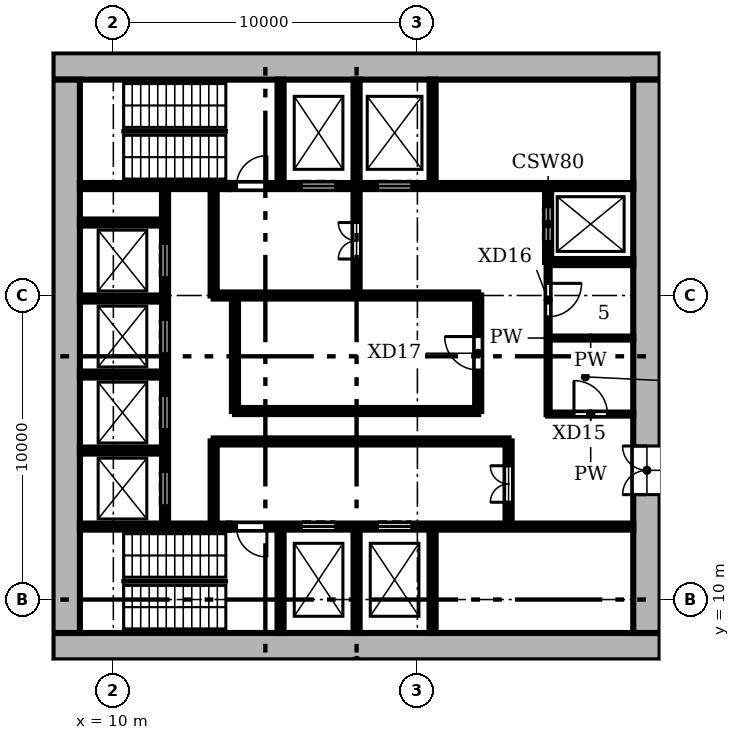
"""IFC4 building model, lengths in metres.
Left out: names, types, materials, properties, quantities, classifications, styles, units other than length and angle.
Written with IfcOpenShell. Run it as: python <this file> out.ifc"""

import sys

from ifc_helpers import new_model, si_unit, direction, frame, frame_2d, origin, place, context, subcontext, project, spatial, rectangle, extrude, element, fill, save


model = new_model("IFC4")
c1 = context("Model", 3, precision=1e-05, world=origin(), true_north=direction((0.0, 1.0)))
c2 = subcontext(c1, "Body", "Model", "MODEL_VIEW")
j1 = project(units=[si_unit("LENGTHUNIT", "METRE"), si_unit("PLANEANGLEUNIT", "RADIAN")], contexts=[c1])
p1 = place(None, origin())
s1 = spatial("IfcSite", under=j1, at=p1, CompositionType="ELEMENT")
p2 = place(p1, origin())
s2 = spatial("IfcBuilding", under=s1, at=p2, CompositionType="ELEMENT")
p3 = place(p2, frame((0.0, 0.0, -9.0)))
s3 = spatial("IfcBuildingStorey", under=s2, at=p3, CompositionType="ELEMENT", Elevation=-9.0)
p4 = place(p3, frame((8.0, 8.45, 0.0), z_axis=(0.0, 0.0, 1.0), x_axis=(1.0, 0.0, 0.0)))
e1 = element("IfcWall", 1, at=p4, inside=s3, PredefinedType="SHEAR", context=c2, shape_type="SweptSolid", body=[
    extrude(rectangle(XDim=20.0, YDim=0.9, at=frame_2d((10.0, 0.0))), origin(), (0.0, 0.0, 1.0), 4.5),
])
p5 = place(p3, frame((27.55, 8.9, 0.0), z_axis=(0.0, 0.0, 1.0), x_axis=(0.0, 1.0, 0.0)))
e2 = element("IfcWall", 2, at=p5, inside=s3, PredefinedType="SHEAR", context=c2, shape_type="SweptSolid", body=[
    extrude(rectangle(XDim=18.2, YDim=0.9, at=frame_2d((9.1, 0.0))), origin(), (0.0, 0.0, 1.0), 4.5),
])
p6 = place(p5, frame((4.55, 0.0, 0.0)))
e3 = element("IfcOpeningElement", 3, at=p6, cuts=e2, PredefinedType="OPENING", context=c2, shape_type="SweptSolid", body=[
    extrude(rectangle(XDim=1.6, YDim=2.1, at=frame_2d((0.8, 1.05))), frame((0.0, 0.46, 0.0), z_axis=(0.0, -1.0, 0.0), x_axis=(1.0, 0.0, 0.0)), (0.0, 0.0, 1.0), 0.92),
])
p7 = place(p3, frame((28.0, 27.55, 0.0), z_axis=(0.0, 0.0, 1.0), x_axis=(-1.0, 0.0, 0.0)))
e4 = element("IfcWall", 4, at=p7, inside=s3, PredefinedType="SHEAR", context=c2, shape_type="SweptSolid", body=[
    extrude(rectangle(XDim=20.0, YDim=0.9, at=frame_2d((10.0, 0.0))), origin(), (0.0, 0.0, 1.0), 4.5),
])
p8 = place(p3, frame((8.45, 27.1, 0.0), z_axis=(0.0, 0.0, 1.0), x_axis=(0.0, -1.0, 0.0)))
e5 = element("IfcWall", 5, at=p8, inside=s3, PredefinedType="SHEAR", context=c2, shape_type="SweptSolid", body=[
    extrude(rectangle(XDim=18.2, YDim=0.9, at=frame_2d((9.1, 0.0))), origin(), (0.0, 0.0, 1.0), 4.5),
])
p9 = place(p3, frame((8.9, 12.4, 0.0), z_axis=(0.0, 0.0, 1.0), x_axis=(1.0, 0.0, 0.0)))
e6 = element("IfcWall", 6, at=p9, inside=s3, PredefinedType="SHEAR", context=c2, shape_type="SweptSolid", body=[
    extrude(rectangle(XDim=4.9, YDim=0.2, at=frame_2d((2.45, 0.0))), origin(), (0.0, 0.0, 1.0), 4.1),
])
p10 = place(p3, frame((13.8, 12.4, 0.0), z_axis=(0.0, 0.0, 1.0), x_axis=(1.0, 0.0, 0.0)))
e7 = element("IfcWall", 7, at=p10, inside=s3, PredefinedType="SHEAR", context=c2, shape_type="SweptSolid", body=[
    extrude(rectangle(XDim=13.3, YDim=0.2, at=frame_2d((6.65, 0.0))), origin(), (0.0, 0.0, 1.0), 4.1),
])
p11 = place(p10, frame((2.4, 0.0, 0.0)))
e8 = element("IfcOpeningElement", 8, at=p11, cuts=e7, PredefinedType="OPENING", context=c2, shape_type="SweptSolid", body=[
    extrude(rectangle(XDim=1.1, YDim=2.1, at=frame_2d((0.55, 1.05))), frame((0.0, 0.11, 0.0), z_axis=(0.0, -1.0, 0.0), x_axis=(1.0, 0.0, 0.0)), (0.0, 0.0, 1.0), 0.22),
])
p12 = place(p10, frame((4.9, 0.0, 0.0)))
e9 = element("IfcOpeningElement", 9, at=p12, cuts=e7, PredefinedType="OPENING", context=c2, shape_type="SweptSolid", body=[
    extrude(rectangle(XDim=1.1, YDim=2.1, at=frame_2d((0.55, 1.05))), frame((0.0, 0.11, 0.0), z_axis=(0.0, -1.0, 0.0), x_axis=(1.0, 0.0, 0.0)), (0.0, 0.0, 1.0), 0.22),
])
p13 = place(p10, frame((0.25, 0.0, 0.0)))
e10 = element("IfcOpeningElement", 10, at=p13, cuts=e7, PredefinedType="OPENING", context=c2, shape_type="SweptSolid", body=[
    extrude(rectangle(XDim=1.0, YDim=2.1, at=frame_2d((0.5, 1.05))), frame((0.0, 0.11, 0.0), z_axis=(0.0, -1.0, 0.0), x_axis=(1.0, 0.0, 0.0)), (0.0, 0.0, 1.0), 0.22),
])
p14 = place(p3, frame((8.9, 14.9, 0.0), z_axis=(0.0, 0.0, 1.0), x_axis=(1.0, 0.0, 0.0)))
e11 = element("IfcWall", 11, at=p14, inside=s3, PredefinedType="SHEAR", context=c2, shape_type="SweptSolid", body=[
    extrude(rectangle(XDim=2.8, YDim=0.2, at=frame_2d((1.4, 0.0))), origin(), (0.0, 0.0, 1.0), 4.1),
])
p15 = place(p3, frame((13.3, 15.2, 0.0), z_axis=(0.0, 0.0, 1.0), x_axis=(1.0, 0.0, 0.0)))
e12 = element("IfcWall", 12, at=p15, inside=s3, PredefinedType="SHEAR", context=c2, shape_type="SweptSolid", body=[
    extrude(rectangle(XDim=9.7, YDim=0.2, at=frame_2d((4.85, 0.0))), origin(), (0.0, 0.0, 1.0), 4.1),
])
p16 = place(p3, frame((24.3, 16.1, 0.0), z_axis=(0.0, 0.0, 1.0), x_axis=(1.0, 0.0, 0.0)))
e13 = element("IfcWall", 13, at=p16, inside=s3, PredefinedType="PARTITIONING", context=c2, shape_type="SweptSolid", body=[
    extrude(rectangle(XDim=2.8, YDim=0.1, at=frame_2d((1.4, 0.0))), origin(), (0.0, 0.0, 1.0), 4.1),
])
p17 = place(p16, frame((0.85, 0.0, 0.0)))
e14 = element("IfcOpeningElement", 14, at=p17, cuts=e13, PredefinedType="OPENING", context=c2, shape_type="SweptSolid", body=[
    extrude(rectangle(XDim=1.1, YDim=2.1, at=frame_2d((0.55, 1.05))), frame((0.0, 0.06, 0.0), z_axis=(0.0, -1.0, 0.0), x_axis=(1.0, 0.0, 0.0)), (0.0, 0.0, 1.0), 0.12),
])
p18 = place(p3, frame((14.0, 16.2, 0.0), z_axis=(0.0, 0.0, 1.0), x_axis=(1.0, 0.0, 0.0)))
e15 = element("IfcWall", 15, at=p18, inside=s3, PredefinedType="SHEAR", context=c2, shape_type="SweptSolid", body=[
    extrude(rectangle(XDim=8.0, YDim=0.2, at=frame_2d((4.0, 0.0))), origin(), (0.0, 0.0, 1.0), 4.1),
])
p19 = place(p3, frame((8.9, 17.4, 0.0), z_axis=(0.0, 0.0, 1.0), x_axis=(1.0, 0.0, 0.0)))
e16 = element("IfcWall", 16, at=p19, inside=s3, PredefinedType="SHEAR", context=c2, shape_type="SweptSolid", body=[
    extrude(rectangle(XDim=2.8, YDim=0.2, at=frame_2d((1.4, 0.0))), origin(), (0.0, 0.0, 1.0), 4.1),
])
p20 = place(p3, frame((24.3, 18.6, 0.0), z_axis=(0.0, 0.0, 1.0), x_axis=(1.0, 0.0, 0.0)))
e17 = element("IfcWall", 17, at=p20, inside=s3, PredefinedType="PARTITIONING", context=c2, shape_type="SweptSolid", body=[
    extrude(rectangle(XDim=2.8, YDim=0.1, at=frame_2d((1.4, 0.0))), origin(), (0.0, 0.0, 1.0), 4.1),
])
p21 = place(p3, frame((8.9, 19.9, 0.0), z_axis=(0.0, 0.0, 1.0), x_axis=(1.0, 0.0, 0.0)))
e18 = element("IfcWall", 18, at=p21, inside=s3, PredefinedType="SHEAR", context=c2, shape_type="SweptSolid", body=[
    extrude(rectangle(XDim=2.8, YDim=0.2, at=frame_2d((1.4, 0.0))), origin(), (0.0, 0.0, 1.0), 4.1),
])
p22 = place(p3, frame((13.3, 20.0, 0.0), z_axis=(0.0, 0.0, 1.0), x_axis=(1.0, 0.0, 0.0)))
e19 = element("IfcWall", 19, at=p22, inside=s3, PredefinedType="SHEAR", context=c2, shape_type="SweptSolid", body=[
    extrude(rectangle(XDim=8.7, YDim=0.2, at=frame_2d((4.35, 0.0))), origin(), (0.0, 0.0, 1.0), 4.1),
])
for number, where, z_axis, x_axis in (
    (20, (24.3, 21.1, 0.0), (0.0, 0.0, 1.0), (1.0, 0.0, 0.0)),
    (21, (8.9, 22.4, 0.0), (0.0, 0.0, 1.0), (1.0, 0.0, 0.0)),
):
    element("IfcWall", number, at=place(p3, frame(where, z_axis=z_axis, x_axis=x_axis)), inside=s3, PredefinedType="SHEAR", context=c2, shape_type="SweptSolid", body=[
        extrude(rectangle(XDim=2.8, YDim=0.2, at=frame_2d((1.4, 0.0))), origin(), (0.0, 0.0, 1.0), 4.1),
    ])
p23 = place(p3, frame((8.9, 23.6, 0.0), z_axis=(0.0, 0.0, 1.0), x_axis=(1.0, 0.0, 0.0)))
e22 = element("IfcWall", 22, at=p23, inside=s3, PredefinedType="SHEAR", context=c2, shape_type="SweptSolid", body=[
    extrude(rectangle(XDim=4.9, YDim=0.2, at=frame_2d((2.45, 0.0))), origin(), (0.0, 0.0, 1.0), 4.1),
])
p24 = place(p3, frame((13.8, 23.6, 0.0), z_axis=(0.0, 0.0, 1.0), x_axis=(1.0, 0.0, 0.0)))
e23 = element("IfcWall", 23, at=p24, inside=s3, PredefinedType="SHEAR", context=c2, shape_type="SweptSolid", body=[
    extrude(rectangle(XDim=13.3, YDim=0.2, at=frame_2d((6.65, 0.0))), origin(), (0.0, 0.0, 1.0), 4.1),
])
p25 = place(p24, frame((2.4, 0.0, 0.0)))
e24 = element("IfcOpeningElement", 24, at=p25, cuts=e23, PredefinedType="OPENING", context=c2, shape_type="SweptSolid", body=[
    extrude(rectangle(XDim=1.1, YDim=2.1, at=frame_2d((0.55, 1.05))), frame((0.0, 0.11, 0.0), z_axis=(0.0, -1.0, 0.0), x_axis=(1.0, 0.0, 0.0)), (0.0, 0.0, 1.0), 0.22),
])
p26 = place(p24, frame((4.9, 0.0, 0.0)))
e25 = element("IfcOpeningElement", 25, at=p26, cuts=e23, PredefinedType="OPENING", context=c2, shape_type="SweptSolid", body=[
    extrude(rectangle(XDim=1.1, YDim=2.1, at=frame_2d((0.55, 1.05))), frame((0.0, 0.11, 0.0), z_axis=(0.0, -1.0, 0.0), x_axis=(1.0, 0.0, 0.0)), (0.0, 0.0, 1.0), 0.22),
])
p27 = place(p24, frame((0.25, 0.0, 0.0)))
e26 = element("IfcOpeningElement", 26, at=p27, cuts=e23, PredefinedType="OPENING", context=c2, shape_type="SweptSolid", body=[
    extrude(rectangle(XDim=1.0, YDim=2.1, at=frame_2d((0.5, 1.05))), frame((0.0, 0.11, 0.0), z_axis=(0.0, -1.0, 0.0), x_axis=(1.0, 0.0, 0.0)), (0.0, 0.0, 1.0), 0.22),
])
p28 = place(p3, frame((11.7, 12.4, 0.0), z_axis=(0.0, 0.0, 1.0), x_axis=(0.0, 1.0, 0.0)))
e27 = element("IfcWall", 27, at=p28, inside=s3, PredefinedType="SHEAR", context=c2, shape_type="SweptSolid", body=[
    extrude(rectangle(XDim=11.2, YDim=0.2, at=frame_2d((5.6, 0.0))), origin(), (0.0, 0.0, 1.0), 4.1),
])
p29 = place(p28, frame((0.7, 0.0, 0.0)))
e28 = element("IfcOpeningElement", 28, at=p29, cuts=e27, PredefinedType="OPENING", context=c2, shape_type="SweptSolid", body=[
    extrude(rectangle(XDim=1.1, YDim=2.1, at=frame_2d((0.55, 1.05))), frame((0.0, 0.11, 0.0), z_axis=(0.0, -1.0, 0.0), x_axis=(1.0, 0.0, 0.0)), (0.0, 0.0, 1.0), 0.22),
])
p30 = place(p28, frame((3.2, 0.0, 0.0)))
e29 = element("IfcOpeningElement", 29, at=p30, cuts=e27, PredefinedType="OPENING", context=c2, shape_type="SweptSolid", body=[
    extrude(rectangle(XDim=1.1, YDim=2.1, at=frame_2d((0.55, 1.05))), frame((0.0, 0.11, 0.0), z_axis=(0.0, -1.0, 0.0), x_axis=(1.0, 0.0, 0.0)), (0.0, 0.0, 1.0), 0.22),
])
p31 = place(p28, frame((5.7, 0.0, 0.0)))
e30 = element("IfcOpeningElement", 30, at=p31, cuts=e27, PredefinedType="OPENING", context=c2, shape_type="SweptSolid", body=[
    extrude(rectangle(XDim=1.1, YDim=2.1, at=frame_2d((0.55, 1.05))), frame((0.0, 0.11, 0.0), z_axis=(0.0, -1.0, 0.0), x_axis=(1.0, 0.0, 0.0)), (0.0, 0.0, 1.0), 0.22),
])
p32 = place(p28, frame((8.2, 0.0, 0.0)))
e31 = element("IfcOpeningElement", 31, at=p32, cuts=e27, PredefinedType="OPENING", context=c2, shape_type="SweptSolid", body=[
    extrude(rectangle(XDim=1.1, YDim=2.1, at=frame_2d((0.55, 1.05))), frame((0.0, 0.11, 0.0), z_axis=(0.0, -1.0, 0.0), x_axis=(1.0, 0.0, 0.0)), (0.0, 0.0, 1.0), 0.22),
])
p33 = place(p3, frame((13.3, 12.4, 0.0), z_axis=(0.0, 0.0, 1.0), x_axis=(0.0, 1.0, 0.0)))
e32 = element("IfcWall", 32, at=p33, inside=s3, PredefinedType="SHEAR", context=c2, shape_type="SweptSolid", body=[
    extrude(rectangle(XDim=2.8, YDim=0.2, at=frame_2d((1.4, 0.0))), origin(), (0.0, 0.0, 1.0), 4.1),
])
p34 = place(p3, frame((13.3, 20.0, 0.0), z_axis=(0.0, 0.0, 1.0), x_axis=(0.0, 1.0, 0.0)))
e33 = element("IfcWall", 33, at=p34, inside=s3, PredefinedType="SHEAR", context=c2, shape_type="SweptSolid", body=[
    extrude(rectangle(XDim=3.6, YDim=0.2, at=frame_2d((1.8, 0.0))), origin(), (0.0, 0.0, 1.0), 4.1),
])
p35 = place(p3, frame((14.0, 16.2, 0.0), z_axis=(0.0, 0.0, 1.0), x_axis=(0.0, 1.0, 0.0)))
e34 = element("IfcWall", 34, at=p35, inside=s3, PredefinedType="SHEAR", context=c2, shape_type="SweptSolid", body=[
    extrude(rectangle(XDim=3.8, YDim=0.2, at=frame_2d((1.9, 0.0))), origin(), (0.0, 0.0, 1.0), 4.1),
])
for number, where, z_axis, x_axis in (
    (35, (15.5, 8.9, 0.0), (0.0, 0.0, 1.0), (0.0, 1.0, 0.0)),
    (36, (15.5, 23.6, 0.0), (0.0, 0.0, 1.0), (0.0, 1.0, 0.0)),
    (37, (18.0, 8.9, 0.0), (0.0, 0.0, 1.0), (0.0, 1.0, 0.0)),
):
    element("IfcWall", number, at=place(p3, frame(where, z_axis=z_axis, x_axis=x_axis)), inside=s3, PredefinedType="SHEAR", context=c2, shape_type="SweptSolid", body=[
        extrude(rectangle(XDim=3.5, YDim=0.2, at=frame_2d((1.75, 0.0))), origin(), (0.0, 0.0, 1.0), 4.1),
    ])
p36 = place(p3, frame((18.0, 20.0, 0.0), z_axis=(0.0, 0.0, 1.0), x_axis=(0.0, 1.0, 0.0)))
e38 = element("IfcWall", 38, at=p36, inside=s3, PredefinedType="SHEAR", context=c2, shape_type="SweptSolid", body=[
    extrude(rectangle(XDim=7.1, YDim=0.2, at=frame_2d((3.55, 0.0))), origin(), (0.0, 0.0, 1.0), 4.1),
])
p37 = place(p36, frame((1.2, 0.0, 0.0)))
e39 = element("IfcOpeningElement", 39, at=p37, cuts=e38, PredefinedType="OPENING", context=c2, shape_type="SweptSolid", body=[
    extrude(rectangle(XDim=1.2, YDim=2.1, at=frame_2d((0.6, 1.05))), frame((0.0, 0.11, 0.0), z_axis=(0.0, -1.0, 0.0), x_axis=(1.0, 0.0, 0.0)), (0.0, 0.0, 1.0), 0.22),
])
for number, where, z_axis, x_axis in (
    (40, (20.5, 8.9, 0.0), (0.0, 0.0, 1.0), (0.0, 1.0, 0.0)),
    (41, (20.5, 23.6, 0.0), (0.0, 0.0, 1.0), (0.0, 1.0, 0.0)),
):
    element("IfcWall", number, at=place(p3, frame(where, z_axis=z_axis, x_axis=x_axis)), inside=s3, PredefinedType="SHEAR", context=c2, shape_type="SweptSolid", body=[
        extrude(rectangle(XDim=3.5, YDim=0.2, at=frame_2d((1.75, 0.0))), origin(), (0.0, 0.0, 1.0), 4.1),
    ])
p38 = place(p3, frame((22.0, 16.2, 0.0), z_axis=(0.0, 0.0, 1.0), x_axis=(0.0, 1.0, 0.0)))
e42 = element("IfcWall", 42, at=p38, inside=s3, PredefinedType="SHEAR", context=c2, shape_type="SweptSolid", body=[
    extrude(rectangle(XDim=3.8, YDim=0.2, at=frame_2d((1.9, 0.0))), origin(), (0.0, 0.0, 1.0), 4.1),
])
p39 = place(p38, frame((1.35, 0.0, 0.0)))
e43 = element("IfcOpeningElement", 43, at=p39, cuts=e42, PredefinedType="OPENING", context=c2, shape_type="SweptSolid", body=[
    extrude(rectangle(XDim=1.1, YDim=2.1, at=frame_2d((0.55, 1.05))), frame((0.0, 0.11, 0.0), z_axis=(0.0, -1.0, 0.0), x_axis=(1.0, 0.0, 0.0)), (0.0, 0.0, 1.0), 0.22),
])
p40 = place(p3, frame((23.0, 12.4, 0.0), z_axis=(0.0, 0.0, 1.0), x_axis=(0.0, 1.0, 0.0)))
e44 = element("IfcWall", 44, at=p40, inside=s3, PredefinedType="SHEAR", context=c2, shape_type="SweptSolid", body=[
    extrude(rectangle(XDim=2.8, YDim=0.2, at=frame_2d((1.4, 0.0))), origin(), (0.0, 0.0, 1.0), 4.1),
])
p41 = place(p40, frame((0.8, 0.0, 0.0)))
e45 = element("IfcOpeningElement", 45, at=p41, cuts=e44, PredefinedType="OPENING", context=c2, shape_type="SweptSolid", body=[
    extrude(rectangle(XDim=1.2, YDim=2.1, at=frame_2d((0.6, 1.05))), frame((0.0, 0.11, 0.0), z_axis=(0.0, -1.0, 0.0), x_axis=(1.0, 0.0, 0.0)), (0.0, 0.0, 1.0), 0.22),
])
p42 = place(p3, frame((24.3, 16.1, 0.0), z_axis=(0.0, 0.0, 1.0), x_axis=(0.0, 1.0, 0.0)))
e46 = element("IfcWall", 46, at=p42, inside=s3, PredefinedType="PARTITIONING", context=c2, shape_type="SweptSolid", body=[
    extrude(rectangle(XDim=5.0, YDim=0.1, at=frame_2d((2.5, 0.0))), origin(), (0.0, 0.0, 1.0), 4.1),
])
p43 = place(p42, frame((3.2, 0.0, 0.0)))
e47 = element("IfcOpeningElement", 47, at=p43, cuts=e46, PredefinedType="OPENING", context=c2, shape_type="SweptSolid", body=[
    extrude(rectangle(XDim=1.1, YDim=2.1, at=frame_2d((0.55, 1.05))), frame((0.0, 0.06, 0.0), z_axis=(0.0, -1.0, 0.0), x_axis=(1.0, 0.0, 0.0)), (0.0, 0.0, 1.0), 0.12),
])
p44 = place(p3, frame((24.3, 21.1, 0.0), z_axis=(0.0, 0.0, 1.0), x_axis=(0.0, 1.0, 0.0)))
e48 = element("IfcWall", 48, at=p44, inside=s3, PredefinedType="SHEAR", context=c2, shape_type="SweptSolid", body=[
    extrude(rectangle(XDim=2.5, YDim=0.2, at=frame_2d((1.25, 0.0))), origin(), (0.0, 0.0, 1.0), 4.1),
])
p45 = place(p44, frame((0.7, 0.0, 0.0)))
e49 = element("IfcOpeningElement", 49, at=p45, cuts=e48, PredefinedType="OPENING", context=c2, shape_type="SweptSolid", body=[
    extrude(rectangle(XDim=1.1, YDim=2.1, at=frame_2d((0.55, 1.05))), frame((0.0, 0.11, 0.0), z_axis=(0.0, -1.0, 0.0), x_axis=(1.0, 0.0, 0.0)), (0.0, 0.0, 1.0), 0.22),
])
p46 = place(p29, origin())
e50 = element("IfcDoor", 50, at=p46, inside=s3, OperationType="DOUBLE_DOOR_SLIDING", PredefinedType="DOOR", context=c2, shape_type="SweptSolid", body=[
    extrude(rectangle(XDim=1.1, YDim=2.1, at=frame_2d((0.55, 1.05))), frame((0.0, 0.025, 0.0), z_axis=(0.0, -1.0, 0.0), x_axis=(1.0, 0.0, 0.0)), (0.0, 0.0, 1.0), 0.05),
])
fill(e28, e50)
p47 = place(p30, origin())
e51 = element("IfcDoor", 51, at=p47, inside=s3, OperationType="DOUBLE_DOOR_SLIDING", PredefinedType="DOOR", context=c2, shape_type="SweptSolid", body=[
    extrude(rectangle(XDim=1.1, YDim=2.1, at=frame_2d((0.55, 1.05))), frame((0.0, 0.025, 0.0), z_axis=(0.0, -1.0, 0.0), x_axis=(1.0, 0.0, 0.0)), (0.0, 0.0, 1.0), 0.05),
])
fill(e29, e51)
p48 = place(p31, origin())
e52 = element("IfcDoor", 52, at=p48, inside=s3, OperationType="DOUBLE_DOOR_SLIDING", PredefinedType="DOOR", context=c2, shape_type="SweptSolid", body=[
    extrude(rectangle(XDim=1.1, YDim=2.1, at=frame_2d((0.55, 1.05))), frame((0.0, 0.025, 0.0), z_axis=(0.0, -1.0, 0.0), x_axis=(1.0, 0.0, 0.0)), (0.0, 0.0, 1.0), 0.05),
])
fill(e30, e52)
p49 = place(p32, origin())
e53 = element("IfcDoor", 53, at=p49, inside=s3, OperationType="DOUBLE_DOOR_SLIDING", PredefinedType="DOOR", context=c2, shape_type="SweptSolid", body=[
    extrude(rectangle(XDim=1.1, YDim=2.1, at=frame_2d((0.55, 1.05))), frame((0.0, 0.025, 0.0), z_axis=(0.0, -1.0, 0.0), x_axis=(1.0, 0.0, 0.0)), (0.0, 0.0, 1.0), 0.05),
])
fill(e31, e53)
p50 = place(p45, origin())
e54 = element("IfcDoor", 54, at=p50, inside=s3, OperationType="DOUBLE_DOOR_SLIDING", PredefinedType="DOOR", context=c2, shape_type="SweptSolid", body=[
    extrude(rectangle(XDim=1.1, YDim=2.1, at=frame_2d((0.55, 1.05))), frame((0.0, 0.025, 0.0), z_axis=(0.0, -1.0, 0.0), x_axis=(1.0, 0.0, 0.0)), (0.0, 0.0, 1.0), 0.05),
])
fill(e49, e54)
p51 = place(p11, origin())
e55 = element("IfcDoor", 55, at=p51, inside=s3, OperationType="DOUBLE_DOOR_SLIDING", PredefinedType="DOOR", context=c2, shape_type="SweptSolid", body=[
    extrude(rectangle(XDim=1.1, YDim=2.1, at=frame_2d((0.55, 1.05))), frame((0.0, 0.025, 0.0), z_axis=(0.0, -1.0, 0.0), x_axis=(1.0, 0.0, 0.0)), (0.0, 0.0, 1.0), 0.05),
])
fill(e8, e55)
p52 = place(p12, origin())
e56 = element("IfcDoor", 56, at=p52, inside=s3, OperationType="DOUBLE_DOOR_SLIDING", PredefinedType="DOOR", context=c2, shape_type="SweptSolid", body=[
    extrude(rectangle(XDim=1.1, YDim=2.1, at=frame_2d((0.55, 1.05))), frame((0.0, 0.025, 0.0), z_axis=(0.0, -1.0, 0.0), x_axis=(1.0, 0.0, 0.0)), (0.0, 0.0, 1.0), 0.05),
])
fill(e9, e56)
p53 = place(p25, origin())
e57 = element("IfcDoor", 57, at=p53, inside=s3, OperationType="DOUBLE_DOOR_SLIDING", PredefinedType="DOOR", context=c2, shape_type="SweptSolid", body=[
    extrude(rectangle(XDim=1.1, YDim=2.1, at=frame_2d((0.55, 1.05))), frame((0.0, 0.025, 0.0), z_axis=(0.0, -1.0, 0.0), x_axis=(1.0, 0.0, 0.0)), (0.0, 0.0, 1.0), 0.05),
])
fill(e24, e57)
p54 = place(p26, origin())
e58 = element("IfcDoor", 58, at=p54, inside=s3, OperationType="DOUBLE_DOOR_SLIDING", PredefinedType="DOOR", context=c2, shape_type="SweptSolid", body=[
    extrude(rectangle(XDim=1.1, YDim=2.1, at=frame_2d((0.55, 1.05))), frame((0.0, 0.025, 0.0), z_axis=(0.0, -1.0, 0.0), x_axis=(1.0, 0.0, 0.0)), (0.0, 0.0, 1.0), 0.05),
])
fill(e25, e58)
p55 = place(p13, frame((1.0, 0.0, 0.0), z_axis=(0.0, 0.0, 1.0), x_axis=(-1.0, 0.0, 0.0)))
e59 = element("IfcDoor", 59, at=p55, inside=s3, OperationType="SINGLE_SWING_LEFT", PredefinedType="DOOR", context=c2, shape_type="SweptSolid", body=[
    extrude(rectangle(XDim=1.0, YDim=2.1, at=frame_2d((0.5, 1.05))), frame((0.0, 0.025, 0.0), z_axis=(0.0, -1.0, 0.0), x_axis=(1.0, 0.0, 0.0)), (0.0, 0.0, 1.0), 0.05),
])
fill(e10, e59)
p56 = place(p27, origin())
e60 = element("IfcDoor", 60, at=p56, inside=s3, OperationType="SINGLE_SWING_RIGHT", PredefinedType="DOOR", context=c2, shape_type="SweptSolid", body=[
    extrude(rectangle(XDim=1.0, YDim=2.1, at=frame_2d((0.5, 1.05))), frame((0.0, 0.025, 0.0), z_axis=(0.0, -1.0, 0.0), x_axis=(1.0, 0.0, 0.0)), (0.0, 0.0, 1.0), 0.05),
])
fill(e26, e60)
p57 = place(p41, origin())
e61 = element("IfcDoor", 61, at=p57, inside=s3, OperationType="DOUBLE_DOOR_SINGLE_SWING", PredefinedType="DOOR", context=c2, shape_type="SweptSolid", body=[
    extrude(rectangle(XDim=1.2, YDim=2.1, at=frame_2d((0.6, 1.05))), frame((0.0, 0.025, 0.0), z_axis=(0.0, -1.0, 0.0), x_axis=(1.0, 0.0, 0.0)), (0.0, 0.0, 1.0), 0.05),
])
fill(e45, e61)
p58 = place(p37, origin())
e62 = element("IfcDoor", 62, at=p58, inside=s3, OperationType="DOUBLE_DOOR_SINGLE_SWING", PredefinedType="DOOR", context=c2, shape_type="SweptSolid", body=[
    extrude(rectangle(XDim=1.2, YDim=2.1, at=frame_2d((0.6, 1.05))), frame((0.0, 0.025, 0.0), z_axis=(0.0, -1.0, 0.0), x_axis=(1.0, 0.0, 0.0)), (0.0, 0.0, 1.0), 0.05),
])
fill(e39, e62)
p59 = place(p17, origin())
e63 = element("IfcDoor", 63, at=p59, inside=s3, OperationType="SINGLE_SWING_LEFT", PredefinedType="DOOR", context=c2, shape_type="SweptSolid", body=[
    extrude(rectangle(XDim=1.1, YDim=2.1, at=frame_2d((0.55, 1.05))), frame((0.0, 0.025, 0.0), z_axis=(0.0, -1.0, 0.0), x_axis=(1.0, 0.0, 0.0)), (0.0, 0.0, 1.0), 0.05),
])
fill(e14, e63)
p60 = place(p43, frame((1.1, 0.0, 0.0), z_axis=(0.0, 0.0, 1.0), x_axis=(-1.0, 0.0, 0.0)))
e64 = element("IfcDoor", 64, at=p60, inside=s3, OperationType="SINGLE_SWING_LEFT", PredefinedType="DOOR", context=c2, shape_type="SweptSolid", body=[
    extrude(rectangle(XDim=1.1, YDim=2.1, at=frame_2d((0.55, 1.05))), frame((0.0, 0.025, 0.0), z_axis=(0.0, -1.0, 0.0), x_axis=(1.0, 0.0, 0.0)), (0.0, 0.0, 1.0), 0.05),
])
fill(e47, e64)
p61 = place(p39, origin())
e65 = element("IfcDoor", 65, at=p61, inside=s3, OperationType="SINGLE_SWING_RIGHT", PredefinedType="DOOR", context=c2, shape_type="SweptSolid", body=[
    extrude(rectangle(XDim=1.1, YDim=2.1, at=frame_2d((0.55, 1.05))), frame((0.0, 0.025, 0.0), z_axis=(0.0, -1.0, 0.0), x_axis=(1.0, 0.0, 0.0)), (0.0, 0.0, 1.0), 0.05),
])
fill(e43, e65)
p62 = place(p6, origin())
e66 = element("IfcDoor", 66, at=p62, inside=s3, OperationType="DOUBLE_DOOR_SINGLE_SWING", PredefinedType="DOOR", context=c2, shape_type="SweptSolid", body=[
    extrude(rectangle(XDim=1.6, YDim=2.1, at=frame_2d((0.8, 1.05))), frame((0.0, 0.025, 0.0), z_axis=(0.0, -1.0, 0.0), x_axis=(1.0, 0.0, 0.0)), (0.0, 0.0, 1.0), 0.05),
])
fill(e3, e66)
save(model, sys.argv[1])
